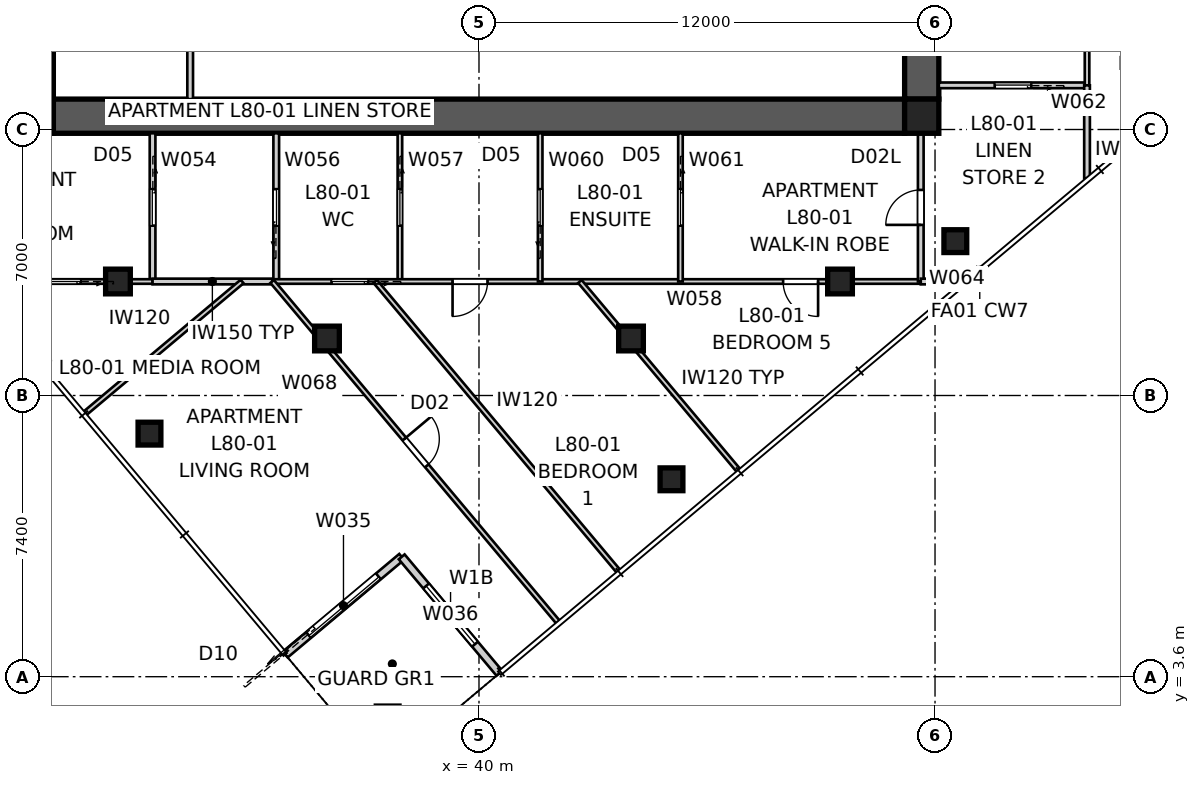
"""IFC4 building model, lengths in metres.
Left out: names, types, materials, properties, quantities, classifications, styles, units other than length and angle.
Written with IfcOpenShell. Run it as: python <this file> out.ifc"""

import sys

from ifc_helpers import new_model, si_unit, direction, frame, frame_2d, origin, origin_2d, place, context, subcontext, project, spatial, polyline, rectangle, outline, extrude, element, fill, save


model = new_model("IFC4")
c1 = context("Model", 3, precision=1e-05, world=origin(), true_north=direction((0.0, 1.0)))
c2 = subcontext(c1, "Body", "Model", "MODEL_VIEW")
j1 = project(units=[si_unit("LENGTHUNIT", "METRE"), si_unit("PLANEANGLEUNIT", "RADIAN")], contexts=[c1])
p1 = place(None, origin())
s1 = spatial("IfcSite", under=j1, at=p1, CompositionType="ELEMENT")
p2 = place(p1, origin())
s2 = spatial("IfcBuilding", under=s1, at=p2, CompositionType="ELEMENT")
p3 = place(p2, frame((0.0, 0.0, 289.6)))
s3 = spatial("IfcBuildingStorey", under=s2, at=p3, CompositionType="ELEMENT", Elevation=289.6)
p4 = place(p3, frame((51.2, 18.35, 0.0), z_axis=(0.0, 0.0, 1.0), x_axis=(-1.0, 0.0, 0.0)))
e1 = element("IfcWall", 1, at=p4, inside=s3, PredefinedType="SHEAR", context=c2, shape_type="SweptSolid", body=[
    extrude(outline(polyline([(0.0, -0.45), (22.4, -0.45), (22.4, -0.025), (22.85, -0.025), (22.85, 0.025), (22.4, 0.025), (22.4, 0.45), (0.0, 0.45), (0.0, 0.025), (-0.45, 0.025), (-0.45, -0.025), (0.0, -0.025), (0.0, -0.45)])), origin(), (0.0, 0.0, 1.0), 3.4),
])
p5 = place(p3, frame((51.65, 18.8, 0.0), z_axis=(0.0, 0.0, 1.0), x_axis=(0.0, 1.0, 0.0)))
e2 = element("IfcWall", 2, at=p5, inside=s3, PredefinedType="SHEAR", context=c2, shape_type="SweptSolid", body=[
    extrude(outline(polyline([(0.0, -0.45), (22.4, -0.45), (22.4, -0.025), (22.85, -0.025), (22.85, 0.025), (22.4, 0.025), (22.4, 0.45), (0.0, 0.45), (0.0, 0.025), (-0.45, 0.025), (-0.45, -0.025), (0.0, -0.025), (0.0, -0.45)])), origin(), (0.0, 0.0, 1.0), 3.4),
])
p6 = place(p5, frame((11.14, 0.0, 0.0)))
e3 = element("IfcOpeningElement", 3, at=p6, cuts=e2, PredefinedType="OPENING", context=c2, shape_type="SweptSolid", body=[
    extrude(rectangle(XDim=1.02, YDim=2.4, at=frame_2d((0.51, 1.2))), frame((0.0, 0.46, 0.0), z_axis=(0.0, -1.0, 0.0), x_axis=(1.0, 0.0, 0.0)), (0.0, 0.0, 1.0), 0.92),
])
p7 = place(p3, frame((28.35, 41.2, 0.0), z_axis=(0.0, 0.0, 1.0), x_axis=(0.0, -1.0, 0.0)))
e4 = element("IfcWall", 4, at=p7, inside=s3, PredefinedType="SHEAR", context=c2, shape_type="SweptSolid", body=[
    extrude(outline(polyline([(0.0, -0.45), (22.4, -0.45), (22.4, -0.025), (22.85, -0.025), (22.85, 0.025), (22.4, 0.025), (22.4, 0.45), (0.0, 0.45), (0.0, 0.025), (-0.45, 0.025), (-0.45, -0.025), (0.0, -0.025), (0.0, -0.45)])), origin(), (0.0, 0.0, 1.0), 3.4),
])
p8 = place(p7, frame((11.14, 0.0, 0.0)))
e5 = element("IfcOpeningElement", 5, at=p8, cuts=e4, PredefinedType="OPENING", context=c2, shape_type="SweptSolid", body=[
    extrude(rectangle(XDim=1.02, YDim=2.4, at=frame_2d((0.51, 1.2))), frame((0.0, 0.46, 0.0), z_axis=(0.0, -1.0, 0.0), x_axis=(1.0, 0.0, 0.0)), (0.0, 0.0, 1.0), 0.92),
])
for number, where, z_axis, x_axis in (
    (6, (28.35, 18.35, 0.0), (0.0, 0.0, 1.0), (1.0, 0.0, 0.0)),
    (7, (51.65, 18.35, 0.0), (0.0, 0.0, 1.0), (1.0, 0.0, 0.0)),
):
    element("IfcColumn", number, at=place(p3, frame(where, z_axis=z_axis, x_axis=x_axis)), inside=s3, PredefinedType="COLUMN", context=c2, shape_type="SweptSolid", body=[
        extrude(rectangle(XDim=0.9, YDim=0.9, at=origin_2d()), origin(), (0.0, 0.0, 1.0), 3.4),
    ])
for number, where, z_axis, x_axis in (
    (8, (45.065, 8.795, 0.0), (0.0, 0.0, 1.0), (1.0, 0.0, 0.0)),
    (9, (52.534, 15.062, 0.0), (0.0, 0.0, 1.0), (1.0, 0.0, 0.0)),
    (10, (31.329, 9.997, 0.0), (0.0, 0.0, 1.0), (1.0, 0.0, 0.0)),
):
    element("IfcColumn", number, at=place(p3, frame(where, z_axis=z_axis, x_axis=x_axis)), inside=s3, PredefinedType="COLUMN", context=c2, shape_type="SweptSolid", body=[
        extrude(rectangle(XDim=0.6, YDim=0.6, at=origin_2d()), origin(), (0.0, 0.0, 1.0), 3.4),
    ])
for number, where, z_axis, x_axis in (
    (11, (30.5, 14.0, 0.0), (0.0, 0.0, 1.0), (1.0, 0.0, 0.0)),
    (12, (36.0, 12.5, 0.0), (0.0, 0.0, 1.0), (1.0, 0.0, 0.0)),
    (13, (44.0, 12.5, 0.0), (0.0, 0.0, 1.0), (1.0, 0.0, 0.0)),
    (14, (49.5, 14.0, 0.0), (0.0, 0.0, 1.0), (1.0, 0.0, 0.0)),
):
    element("IfcColumn", number, at=place(p3, frame(where, z_axis=z_axis, x_axis=x_axis)), inside=s3, PredefinedType="COLUMN", context=c2, shape_type="SweptSolid", body=[
        extrude(rectangle(XDim=0.65, YDim=0.65, at=origin_2d()), origin(), (0.0, 0.0, 1.0), 3.4),
    ])
p9 = place(p3, frame((34.902, 4.183, 0.0), z_axis=(0.0, 0.0, 1.0), x_axis=(0.766060656284, 0.642768287094, 0.0)))
e15 = element("IfcWall", 15, at=p9, inside=s3, PredefinedType="SOLIDWALL", context=c2, shape_type="SweptSolid", body=[
    extrude(rectangle(XDim=4.0, YDim=0.2, at=frame_2d((2.0, 0.0))), origin(), (0.0, 0.0, 1.0), 3.25),
])
p10 = place(p9, frame((0.8, 0.0, 0.0)))
e16 = element("IfcOpeningElement", 16, at=p10, cuts=e15, PredefinedType="OPENING", context=c2, shape_type="SweptSolid", body=[
    extrude(rectangle(XDim=2.4, YDim=2.4, at=frame_2d((1.2, 1.2))), frame((0.0, 0.11, 0.0), z_axis=(0.0, -1.0, 0.0), x_axis=(1.0, 0.0, 0.0)), (0.0, 0.0, 1.0), 0.22),
])
p11 = place(p3, frame((37.966, 6.754, 0.0), z_axis=(0.0, 0.0, 1.0), x_axis=(0.642798342015, -0.766035437498, 0.0)))
e17 = element("IfcWall", 17, at=p11, inside=s3, PredefinedType="SOLIDWALL", context=c2, shape_type="SweptSolid", body=[
    extrude(rectangle(XDim=4.0, YDim=0.2, at=frame_2d((2.0, 0.0))), origin(), (0.0, 0.0, 1.0), 3.25),
])
p12 = place(p11, frame((1.0, 0.0, 0.45)))
e18 = element("IfcOpeningElement", 18, at=p12, cuts=e17, PredefinedType="OPENING", context=c2, shape_type="SweptSolid", body=[
    extrude(rectangle(XDim=2.0, YDim=1.8, at=frame_2d((1.0, 0.9))), frame((0.0, 0.11, 0.0), z_axis=(0.0, -1.0, 0.0), x_axis=(1.0, 0.0, 0.0)), (0.0, 0.0, 1.0), 0.22),
])
p13 = place(p3, frame((32.4, 18.8, 0.0), z_axis=(0.0, 0.0, 1.0), x_axis=(0.0, 1.0, 0.0)))
e19 = element("IfcWall", 19, at=p13, inside=s3, PredefinedType="SOLIDWALL", context=c2, shape_type="SweptSolid", body=[
    extrude(rectangle(XDim=5.9, YDim=0.15, at=frame_2d((2.95, 0.0))), origin(), (0.0, 0.0, 1.0), 3.25),
])
p14 = place(p3, frame((31.41, 17.9, 0.0), z_axis=(0.0, 0.0, 1.0), x_axis=(0.0, -1.0, 0.0)))
e20 = element("IfcWall", 20, at=p14, inside=s3, PredefinedType="SOLIDWALL", context=c2, shape_type="SweptSolid", body=[
    extrude(rectangle(XDim=3.9, YDim=0.15, at=frame_2d((1.95, 0.0))), origin(), (0.0, 0.0, 1.0), 3.25),
])
p15 = place(p14, frame((1.47, 0.0, 0.0)))
e21 = element("IfcOpeningElement", 21, at=p15, cuts=e20, PredefinedType="OPENING", context=c2, shape_type="SweptSolid", body=[
    extrude(rectangle(XDim=0.96, YDim=2.1, at=frame_2d((0.48, 1.05))), frame((0.0, 0.085, 0.0), z_axis=(0.0, -1.0, 0.0), x_axis=(1.0, 0.0, 0.0)), (0.0, 0.0, 1.0), 0.17),
])
p16 = place(p3, frame((31.41, 14.0, 0.0), z_axis=(0.0, 0.0, 1.0), x_axis=(-1.0, 0.0, 0.0)))
e22 = element("IfcWall", 22, at=p16, inside=s3, PredefinedType="PARTITIONING", context=c2, shape_type="SweptSolid", body=[
    extrude(rectangle(XDim=4.693, YDim=0.12, at=frame_2d((2.347, 0.0))), origin(), (0.0, 0.0, 1.0), 2.55),
])
p17 = place(p16, frame((1.893, 0.0, 0.0)))
e23 = element("IfcOpeningElement", 23, at=p17, cuts=e22, PredefinedType="OPENING", context=c2, shape_type="SweptSolid", body=[
    extrude(rectangle(XDim=0.96, YDim=2.1, at=frame_2d((0.48, 1.05))), frame((0.0, 0.07, 0.0), z_axis=(0.0, -1.0, 0.0), x_axis=(1.0, 0.0, 0.0)), (0.0, 0.0, 1.0), 0.14),
])
p18 = place(p3, frame((34.665, 14.0, 0.0), z_axis=(0.0, 0.0, 1.0), x_axis=(0.0, 1.0, 0.0)))
e24 = element("IfcWall", 24, at=p18, inside=s3, PredefinedType="SOLIDWALL", context=c2, shape_type="SweptSolid", body=[
    extrude(rectangle(XDim=3.9, YDim=0.15, at=frame_2d((1.95, 0.0))), origin(), (0.0, 0.0, 1.0), 3.25),
])
p19 = place(p18, frame((1.47, 0.0, 0.0)))
e25 = element("IfcOpeningElement", 25, at=p19, cuts=e24, PredefinedType="OPENING", context=c2, shape_type="SweptSolid", body=[
    extrude(rectangle(XDim=0.96, YDim=2.1, at=frame_2d((0.48, 1.05))), frame((0.0, 0.085, 0.0), z_axis=(0.0, -1.0, 0.0), x_axis=(1.0, 0.0, 0.0)), (0.0, 0.0, 1.0), 0.17),
])
p20 = place(p3, frame((37.919, 17.9, 0.0), z_axis=(0.0, 0.0, 1.0), x_axis=(0.0, -1.0, 0.0)))
e26 = element("IfcWall", 26, at=p20, inside=s3, PredefinedType="PARTITIONING", context=c2, shape_type="SweptSolid", body=[
    extrude(rectangle(XDim=3.9, YDim=0.12, at=frame_2d((1.95, 0.0))), origin(), (0.0, 0.0, 1.0), 3.25),
])
p21 = place(p20, frame((1.47, 0.0, 0.0)))
e27 = element("IfcOpeningElement", 27, at=p21, cuts=e26, PredefinedType="OPENING", context=c2, shape_type="SweptSolid", body=[
    extrude(rectangle(XDim=0.96, YDim=2.1, at=frame_2d((0.48, 1.05))), frame((0.0, 0.07, 0.0), z_axis=(0.0, -1.0, 0.0), x_axis=(1.0, 0.0, 0.0)), (0.0, 0.0, 1.0), 0.14),
])
p22 = place(p3, frame((51.625, 14.0, 0.0), z_axis=(0.0, 0.0, 1.0), x_axis=(-1.0, 0.0, 0.0)))
e28 = element("IfcWall", 28, at=p22, inside=s3, PredefinedType="PARTITIONING", context=c2, shape_type="SweptSolid", body=[
    extrude(rectangle(XDim=17.067, YDim=0.12, at=frame_2d((8.533, 0.0))), origin(), (0.0, 0.0, 1.0), 2.55),
])
p23 = place(p22, frame((2.702, 0.0, 0.0)))
e29 = element("IfcOpeningElement", 29, at=p23, cuts=e28, PredefinedType="OPENING", context=c2, shape_type="SweptSolid", body=[
    extrude(rectangle(XDim=0.92, YDim=2.34, at=frame_2d((0.46, 1.17))), frame((0.0, 0.07, 0.0), z_axis=(0.0, -1.0, 0.0), x_axis=(1.0, 0.0, 0.0)), (0.0, 0.0, 1.0), 0.14),
])
p24 = place(p22, frame((11.4, 0.0, 0.0)))
e30 = element("IfcOpeningElement", 30, at=p24, cuts=e28, PredefinedType="OPENING", context=c2, shape_type="SweptSolid", body=[
    extrude(rectangle(XDim=0.92, YDim=2.34, at=frame_2d((0.46, 1.17))), frame((0.0, 0.07, 0.0), z_axis=(0.0, -1.0, 0.0), x_axis=(1.0, 0.0, 0.0)), (0.0, 0.0, 1.0), 0.14),
])
p25 = place(p22, frame((14.544, 0.0, 0.0)))
e31 = element("IfcOpeningElement", 31, at=p25, cuts=e28, PredefinedType="OPENING", context=c2, shape_type="SweptSolid", body=[
    extrude(rectangle(XDim=0.96, YDim=2.1, at=frame_2d((0.48, 1.05))), frame((0.0, 0.07, 0.0), z_axis=(0.0, -1.0, 0.0), x_axis=(1.0, 0.0, 0.0)), (0.0, 0.0, 1.0), 0.14),
])
p26 = place(p3, frame((34.558, 14.0, 0.0), z_axis=(0.0, 0.0, 1.0), x_axis=(-1.0, 0.0, 0.0)))
e32 = element("IfcWall", 32, at=p26, inside=s3, PredefinedType="SOLIDWALL", context=c2, shape_type="SweptSolid", body=[
    extrude(rectangle(XDim=3.147, YDim=0.15, at=frame_2d((1.574, 0.0))), origin(), (0.0, 0.0, 1.0), 3.25),
])
p27 = place(p3, frame((41.61, 14.0, 0.0), z_axis=(0.0, 0.0, 1.0), x_axis=(0.0, 1.0, 0.0)))
e33 = element("IfcWall", 33, at=p27, inside=s3, PredefinedType="PARTITIONING", context=c2, shape_type="SweptSolid", body=[
    extrude(rectangle(XDim=3.9, YDim=0.12, at=frame_2d((1.95, 0.0))), origin(), (0.0, 0.0, 1.0), 3.25),
])
p28 = place(p27, frame((1.47, 0.0, 0.0)))
e34 = element("IfcOpeningElement", 34, at=p28, cuts=e33, PredefinedType="OPENING", context=c2, shape_type="SweptSolid", body=[
    extrude(rectangle(XDim=0.96, YDim=2.1, at=frame_2d((0.48, 1.05))), frame((0.0, 0.07, 0.0), z_axis=(0.0, -1.0, 0.0), x_axis=(1.0, 0.0, 0.0)), (0.0, 0.0, 1.0), 0.14),
])
p29 = place(p3, frame((45.301, 17.9, 0.0), z_axis=(0.0, 0.0, 1.0), x_axis=(0.0, -1.0, 0.0)))
e35 = element("IfcWall", 35, at=p29, inside=s3, PredefinedType="PARTITIONING", context=c2, shape_type="SweptSolid", body=[
    extrude(rectangle(XDim=3.9, YDim=0.12, at=frame_2d((1.95, 0.0))), origin(), (0.0, 0.0, 1.0), 3.25),
])
p30 = place(p29, frame((1.47, 0.0, 0.0)))
e36 = element("IfcOpeningElement", 36, at=p30, cuts=e35, PredefinedType="OPENING", context=c2, shape_type="SweptSolid", body=[
    extrude(rectangle(XDim=0.96, YDim=2.1, at=frame_2d((0.48, 1.05))), frame((0.0, 0.07, 0.0), z_axis=(0.0, -1.0, 0.0), x_axis=(1.0, 0.0, 0.0)), (0.0, 0.0, 1.0), 0.14),
])
p31 = place(p3, frame((56.0, 19.162, 0.0), z_axis=(0.0, 0.0, 1.0), x_axis=(-1.0, 0.0, 0.0)))
e37 = element("IfcWall", 37, at=p31, inside=s3, PredefinedType="SOLIDWALL", context=c2, shape_type="SweptSolid", body=[
    extrude(rectangle(XDim=3.9, YDim=0.15, at=frame_2d((1.95, 0.0))), origin(), (0.0, 0.0, 1.0), 3.25),
])
p32 = place(p31, frame((1.47, 0.0, 0.0)))
e38 = element("IfcOpeningElement", 38, at=p32, cuts=e37, PredefinedType="OPENING", context=c2, shape_type="SweptSolid", body=[
    extrude(rectangle(XDim=0.96, YDim=2.1, at=frame_2d((0.48, 1.05))), frame((0.0, 0.085, 0.0), z_axis=(0.0, -1.0, 0.0), x_axis=(1.0, 0.0, 0.0)), (0.0, 0.0, 1.0), 0.17),
])
p33 = place(p3, frame((56.0, 23.681, 0.0), z_axis=(0.0, 0.0, 1.0), x_axis=(0.0, -1.0, 0.0)))
e39 = element("IfcWall", 39, at=p33, inside=s3, PredefinedType="PARTITIONING", context=c2, shape_type="SweptSolid", body=[
    extrude(rectangle(XDim=4.519, YDim=0.12, at=frame_2d((2.26, 0.0))), origin(), (0.0, 0.0, 1.0), 2.55),
])
p34 = place(p33, frame((1.78, 0.0, 0.0)))
e40 = element("IfcOpeningElement", 40, at=p34, cuts=e39, PredefinedType="OPENING", context=c2, shape_type="SweptSolid", body=[
    extrude(rectangle(XDim=0.96, YDim=2.1, at=frame_2d((0.48, 1.05))), frame((0.0, 0.07, 0.0), z_axis=(0.0, -1.0, 0.0), x_axis=(1.0, 0.0, 0.0)), (0.0, 0.0, 1.0), 0.14),
])
p35 = place(p3, frame((51.625, 14.0, 0.0), z_axis=(0.0, 0.0, 1.0), x_axis=(0.0, 1.0, 0.0)))
e41 = element("IfcWall", 41, at=p35, inside=s3, PredefinedType="SOLIDWALL", context=c2, shape_type="SweptSolid", body=[
    extrude(rectangle(XDim=3.9, YDim=0.15, at=frame_2d((1.95, 0.0))), origin(), (0.0, 0.0, 1.0), 3.25),
])
p36 = place(p35, frame((1.49, 0.0, 0.0)))
e42 = element("IfcOpeningElement", 42, at=p36, cuts=e41, PredefinedType="OPENING", context=c2, shape_type="SweptSolid", body=[
    extrude(rectangle(XDim=0.92, YDim=2.1, at=frame_2d((0.46, 1.05))), frame((0.0, 0.085, 0.0), z_axis=(0.0, -1.0, 0.0), x_axis=(1.0, 0.0, 0.0)), (0.0, 0.0, 1.0), 0.17),
])
p37 = place(p3, frame((52.762, 14.0, 0.0), z_axis=(0.0, 0.0, 1.0), x_axis=(-1.0, 0.0, 0.0)))
e43 = element("IfcWall", 43, at=p37, inside=s3, PredefinedType="SOLIDWALL", context=c2, shape_type="SweptSolid", body=[
    extrude(rectangle(XDim=1.137, YDim=0.15, at=frame_2d((0.569, 0.0))), origin(), (0.0, 0.0, 1.0), 3.25),
])
p38 = place(p3, frame((56.0, 19.162, 0.0), z_axis=(0.0, 0.0, 1.0), x_axis=(0.0, -1.0, 0.0)))
e44 = element("IfcWall", 44, at=p38, inside=s3, PredefinedType="SOLIDWALL", context=c2, shape_type="SweptSolid", body=[
    extrude(rectangle(XDim=2.445, YDim=0.15, at=frame_2d((1.222, 0.0))), origin(), (0.0, 0.0, 1.0), 3.25),
])
p39 = place(p3, frame((34.558, 14.0, 0.0), z_axis=(0.0, 0.0, 1.0), x_axis=(0.642782931909, -0.766048368216, 0.0)))
e45 = element("IfcWall", 45, at=p39, inside=s3, PredefinedType="PARTITIONING", context=c2, shape_type="SweptSolid", body=[
    extrude(rectangle(XDim=11.701, YDim=0.12, at=frame_2d((5.851, 0.0))), origin(), (0.0, 0.0, 1.0), 3.25),
])
p40 = place(p39, frame((5.411, 0.0, 0.0)))
e46 = element("IfcOpeningElement", 46, at=p40, cuts=e45, PredefinedType="OPENING", context=c2, shape_type="SweptSolid", body=[
    extrude(rectangle(XDim=0.92, YDim=2.34, at=frame_2d((0.46, 1.17))), frame((0.0, 0.07, 0.0), z_axis=(0.0, -1.0, 0.0), x_axis=(1.0, 0.0, 0.0)), (0.0, 0.0, 1.0), 0.14),
])
p41 = place(p3, frame((29.63, 10.529, 0.0), z_axis=(0.0, 0.0, 1.0), x_axis=(0.766034275706, 0.642799726543, 0.0)))
e47 = element("IfcWall", 47, at=p41, inside=s3, PredefinedType="PARTITIONING", context=c2, shape_type="SweptSolid", body=[
    extrude(rectangle(XDim=5.4, YDim=0.12, at=frame_2d((2.7, 0.0))), origin(), (0.0, 0.0, 1.0), 3.25),
])
p42 = place(p3, frame((42.656, 14.0, 0.0), z_axis=(0.0, 0.0, 1.0), x_axis=(0.642779498388, -0.766051249233, 0.0)))
e48 = element("IfcWall", 48, at=p42, inside=s3, PredefinedType="PARTITIONING", context=c2, shape_type="SweptSolid", body=[
    extrude(rectangle(XDim=6.496, YDim=0.12, at=frame_2d((3.248, 0.0))), origin(), (0.0, 0.0, 1.0), 3.25),
])
p43 = place(p3, frame((43.672, 6.372, 0.0), z_axis=(0.0, 0.0, 1.0), x_axis=(-0.64278775678, 0.766044319693, 0.0)))
e49 = element("IfcWall", 49, at=p43, inside=s3, PredefinedType="PARTITIONING", context=c2, shape_type="SweptSolid", body=[
    extrude(rectangle(XDim=9.957, YDim=0.12, at=frame_2d((4.979, 0.0))), origin(), (0.0, 0.0, 1.0), 3.25),
])
p44 = place(p3, frame((59.816, 19.919, 0.0), z_axis=(0.0, 0.0, 1.0), x_axis=(-0.642773197476, 0.766056536168, 0.0)))
e50 = element("IfcWall", 50, at=p44, inside=s3, PredefinedType="PARTITIONING", context=c2, shape_type="SweptSolid", body=[
    extrude(rectangle(XDim=5.4, YDim=0.12, at=frame_2d((2.7, 0.0))), origin(), (0.0, 0.0, 1.0), 3.25),
])
p45 = place(p3, frame((51.625, 17.9, 0.0), z_axis=(0.0, 0.0, 1.0), x_axis=(0.027925096799, 0.999610018442, 0.0)))
e51 = element("IfcWall", 51, at=p45, inside=s3, PredefinedType="SOLIDWALL", context=c2, shape_type="SweptSolid", body=[
    extrude(rectangle(XDim=0.9, YDim=0.15, at=frame_2d((0.45, 0.0))), origin(), (0.0, 0.0, 1.0), 3.25),
])
p46 = place(p10, origin())
e52 = element("IfcDoor", 52, at=p46, inside=s3, OperationType="SLIDING_TO_LEFT", PredefinedType="DOOR", context=c2, shape_type="SweptSolid", body=[
    extrude(rectangle(XDim=2.4, YDim=2.4, at=frame_2d((1.2, 1.2))), frame((0.0, 0.025, 0.0), z_axis=(0.0, -1.0, 0.0), x_axis=(1.0, 0.0, 0.0)), (0.0, 0.0, 1.0), 0.05),
])
fill(e16, e52)
p47 = place(p12, origin())
e53 = element("IfcWindow", 53, at=p47, inside=s3, PartitioningType="SINGLE_PANEL", PredefinedType="WINDOW", context=c2, shape_type="SweptSolid", body=[
    extrude(rectangle(XDim=2.0, YDim=1.8, at=frame_2d((1.0, 0.9))), frame((0.0, 0.03, 0.0), z_axis=(0.0, -1.0, 0.0), x_axis=(1.0, 0.0, 0.0)), (0.0, 0.0, 1.0), 0.06),
])
fill(e18, e53)
p48 = place(p32, origin())
e54 = element("IfcDoor", 54, at=p48, inside=s3, OperationType="SLIDING_TO_LEFT", PredefinedType="DOOR", context=c2, shape_type="SweptSolid", body=[
    extrude(rectangle(XDim=0.96, YDim=2.1, at=frame_2d((0.48, 1.05))), frame((0.0, 0.025, 0.0), z_axis=(0.0, -1.0, 0.0), x_axis=(1.0, 0.0, 0.0)), (0.0, 0.0, 1.0), 0.05),
])
fill(e38, e54)
p49 = place(p36, origin())
e55 = element("IfcDoor", 55, at=p49, inside=s3, OperationType="SINGLE_SWING_LEFT", PredefinedType="DOOR", context=c2, shape_type="SweptSolid", body=[
    extrude(rectangle(XDim=0.92, YDim=2.1, at=frame_2d((0.46, 1.05))), frame((0.0, 0.025, 0.0), z_axis=(0.0, -1.0, 0.0), x_axis=(1.0, 0.0, 0.0)), (0.0, 0.0, 1.0), 0.05),
])
fill(e42, e55)
p50 = place(p23, origin())
e56 = element("IfcDoor", 56, at=p50, inside=s3, OperationType="SINGLE_SWING_LEFT", PredefinedType="DOOR", context=c2, shape_type="SweptSolid", body=[
    extrude(rectangle(XDim=0.92, YDim=2.34, at=frame_2d((0.46, 1.17))), frame((0.0, 0.025, 0.0), z_axis=(0.0, -1.0, 0.0), x_axis=(1.0, 0.0, 0.0)), (0.0, 0.0, 1.0), 0.05),
])
fill(e29, e56)
p51 = place(p30, origin())
e57 = element("IfcDoor", 57, at=p51, inside=s3, OperationType="SLIDING_TO_LEFT", PredefinedType="DOOR", context=c2, shape_type="SweptSolid", body=[
    extrude(rectangle(XDim=0.96, YDim=2.1, at=frame_2d((0.48, 1.05))), frame((0.0, 0.025, 0.0), z_axis=(0.0, -1.0, 0.0), x_axis=(1.0, 0.0, 0.0)), (0.0, 0.0, 1.0), 0.05),
])
fill(e36, e57)
p52 = place(p28, origin())
e58 = element("IfcDoor", 58, at=p52, inside=s3, OperationType="SLIDING_TO_LEFT", PredefinedType="DOOR", context=c2, shape_type="SweptSolid", body=[
    extrude(rectangle(XDim=0.96, YDim=2.1, at=frame_2d((0.48, 1.05))), frame((0.0, 0.025, 0.0), z_axis=(0.0, -1.0, 0.0), x_axis=(1.0, 0.0, 0.0)), (0.0, 0.0, 1.0), 0.05),
])
fill(e34, e58)
p53 = place(p21, origin())
e59 = element("IfcDoor", 59, at=p53, inside=s3, OperationType="SLIDING_TO_LEFT", PredefinedType="DOOR", context=c2, shape_type="SweptSolid", body=[
    extrude(rectangle(XDim=0.96, YDim=2.1, at=frame_2d((0.48, 1.05))), frame((0.0, 0.025, 0.0), z_axis=(0.0, -1.0, 0.0), x_axis=(1.0, 0.0, 0.0)), (0.0, 0.0, 1.0), 0.05),
])
fill(e27, e59)
p54 = place(p24, origin())
e60 = element("IfcDoor", 60, at=p54, inside=s3, OperationType="SINGLE_SWING_RIGHT", PredefinedType="DOOR", context=c2, shape_type="SweptSolid", body=[
    extrude(rectangle(XDim=0.92, YDim=2.34, at=frame_2d((0.46, 1.17))), frame((0.0, 0.025, 0.0), z_axis=(0.0, -1.0, 0.0), x_axis=(1.0, 0.0, 0.0)), (0.0, 0.0, 1.0), 0.05),
])
fill(e30, e60)
p55 = place(p19, origin())
e61 = element("IfcDoor", 61, at=p55, inside=s3, OperationType="SLIDING_TO_LEFT", PredefinedType="DOOR", context=c2, shape_type="SweptSolid", body=[
    extrude(rectangle(XDim=0.96, YDim=2.1, at=frame_2d((0.48, 1.05))), frame((0.0, 0.025, 0.0), z_axis=(0.0, -1.0, 0.0), x_axis=(1.0, 0.0, 0.0)), (0.0, 0.0, 1.0), 0.05),
])
fill(e25, e61)
p56 = place(p25, origin())
e62 = element("IfcDoor", 62, at=p56, inside=s3, OperationType="SLIDING_TO_LEFT", PredefinedType="DOOR", context=c2, shape_type="SweptSolid", body=[
    extrude(rectangle(XDim=0.96, YDim=2.1, at=frame_2d((0.48, 1.05))), frame((0.0, 0.025, 0.0), z_axis=(0.0, -1.0, 0.0), x_axis=(1.0, 0.0, 0.0)), (0.0, 0.0, 1.0), 0.05),
])
fill(e31, e62)
p57 = place(p15, origin())
e63 = element("IfcDoor", 63, at=p57, inside=s3, OperationType="SLIDING_TO_LEFT", PredefinedType="DOOR", context=c2, shape_type="SweptSolid", body=[
    extrude(rectangle(XDim=0.96, YDim=2.1, at=frame_2d((0.48, 1.05))), frame((0.0, 0.025, 0.0), z_axis=(0.0, -1.0, 0.0), x_axis=(1.0, 0.0, 0.0)), (0.0, 0.0, 1.0), 0.05),
])
fill(e21, e63)
p58 = place(p40, origin())
e64 = element("IfcDoor", 64, at=p58, inside=s3, OperationType="SINGLE_SWING_LEFT", PredefinedType="DOOR", context=c2, shape_type="SweptSolid", body=[
    extrude(rectangle(XDim=0.92, YDim=2.34, at=frame_2d((0.46, 1.17))), frame((0.0, 0.025, 0.0), z_axis=(0.0, -1.0, 0.0), x_axis=(1.0, 0.0, 0.0)), (0.0, 0.0, 1.0), 0.05),
])
fill(e46, e64)
p59 = place(p17, origin())
e65 = element("IfcDoor", 65, at=p59, inside=s3, OperationType="SLIDING_TO_LEFT", PredefinedType="DOOR", context=c2, shape_type="SweptSolid", body=[
    extrude(rectangle(XDim=0.96, YDim=2.1, at=frame_2d((0.48, 1.05))), frame((0.0, 0.025, 0.0), z_axis=(0.0, -1.0, 0.0), x_axis=(1.0, 0.0, 0.0)), (0.0, 0.0, 1.0), 0.05),
])
fill(e23, e65)
save(model, sys.argv[1])
